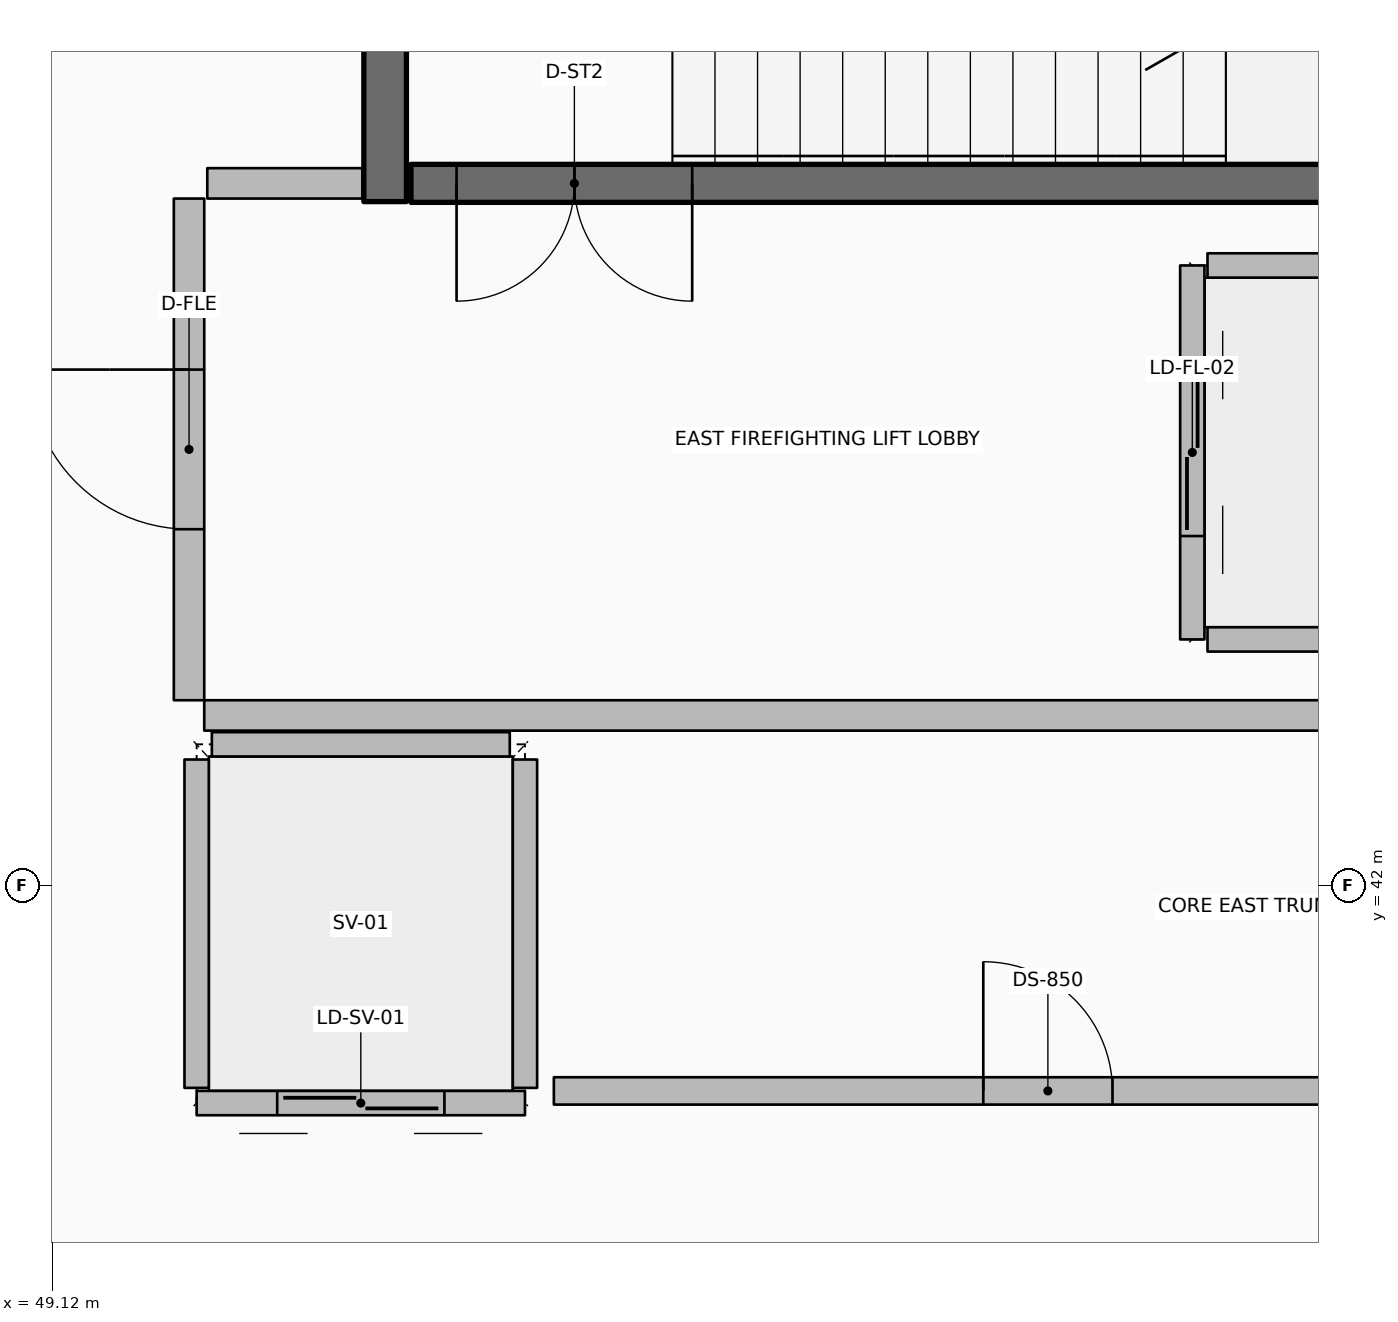
"""IFC4 building model, lengths in metres.
Left out: names, types, materials, properties, quantities, classifications, styles, units other than length and angle.
Written with IfcOpenShell. Run it as: python <this file> out.ifc"""

import sys

from ifc_helpers import new_model, si_unit, direction, frame, frame_2d, origin, origin_2d, place, context, subcontext, project, spatial, rectangle, hollow_rectangle, extrude, element, fill, save


model = new_model("IFC4")
c1 = context("Model", 3, precision=1e-05, world=origin(), true_north=direction((0.0, 1.0)))
c2 = subcontext(c1, "Body", "Model", "MODEL_VIEW")
j1 = project(units=[si_unit("LENGTHUNIT", "METRE"), si_unit("PLANEANGLEUNIT", "RADIAN")], contexts=[c1])
p1 = place(None, origin())
s1 = spatial("IfcSite", under=j1, at=p1, CompositionType="ELEMENT")
p2 = place(p1, origin())
s2 = spatial("IfcBuilding", under=s1, at=p2, CompositionType="ELEMENT")
p3 = place(p2, frame((0.0, 0.0, 123.0)))
s3 = spatial("IfcBuildingStorey", under=s2, at=p3, CompositionType="ELEMENT", Elevation=123.0)
p4 = place(p3, frame((51.31, 46.5, 0.0), z_axis=(0.0, 0.0, 1.0), x_axis=(0.0, 1.0, 0.0)))
e1 = element("IfcWall", 1, at=p4, inside=s3, PredefinedType="SHEAR", context=c2, shape_type="SweptSolid", body=[
    extrude(rectangle(XDim=3.5, YDim=0.28, at=frame_2d((1.75, 0.0))), origin(), (0.0, 0.0, 1.0), 4.8),
])
p5 = place(p3, frame((56.84, 46.62, 0.0), z_axis=(0.0, 0.0, 1.0), x_axis=(1.0, 0.0, 0.0)))
e2 = element("IfcColumn", 2, at=p5, inside=s3, PredefinedType="COLUMN", context=c2, shape_type="SweptSolid", body=[
    extrude(hollow_rectangle(XDim=0.2, YDim=0.2, WallThickness=0.01, InnerFilletRadius=0.01, OuterFilletRadius=0.02, at=origin_2d()), origin(), (0.0, 0.0, 1.0), 2.195),
])
p6 = place(p3, frame((51.48, 46.62, 0.0), z_axis=(0.0, 0.0, 1.0), x_axis=(1.0, 0.0, 0.0)))
e3 = element("IfcWall", 3, at=p6, inside=s3, PredefinedType="SOLIDWALL", context=c2, shape_type="SweptSolid", body=[
    extrude(rectangle(XDim=7.54, YDim=0.25, at=frame_2d((3.77, 0.0))), origin(), (0.0, 0.0, 1.0), 4.4),
])
p7 = place(p6, frame((0.3, 0.0, 0.0)))
e4 = element("IfcOpeningElement", 4, at=p7, cuts=e3, PredefinedType="OPENING", context=c2, shape_type="SweptSolid", body=[
    extrude(rectangle(XDim=1.55, YDim=2.15, at=frame_2d((0.775, 1.075))), frame((0.0, 0.135, 0.0), z_axis=(0.0, -1.0, 0.0), x_axis=(1.0, 0.0, 0.0)), (0.0, 0.0, 1.0), 0.27),
])
p8 = place(p3, frame((56.62, 46.08, 0.0), z_axis=(0.0, 0.0, 1.0), x_axis=(0.0, -1.0, 0.0)))
e5 = element("IfcWall", 5, at=p8, inside=s3, PredefinedType="PARTITIONING", context=c2, shape_type="SweptSolid", body=[
    extrude(rectangle(XDim=2.46, YDim=0.16, at=frame_2d((1.23, 0.0))), origin(), (0.0, 0.0, 1.0), 4.4),
])
p9 = place(p8, frame((0.68, 0.0, 0.0)))
e6 = element("IfcOpeningElement", 6, at=p9, cuts=e5, PredefinedType="OPENING", context=c2, shape_type="SweptSolid", body=[
    extrude(rectangle(XDim=1.1, YDim=2.1, at=frame_2d((0.55, 1.05))), frame((0.0, 0.09, 0.0), z_axis=(0.0, -1.0, 0.0), x_axis=(1.0, 0.0, 0.0)), (0.0, 0.0, 1.0), 0.18),
])
for number, where, z_axis, x_axis in (
    (7, (56.72, 46.08, 0.0), (0.0, 0.0, 1.0), (1.0, 0.0, 0.0)),
    (8, (56.72, 43.62, 0.0), (0.0, 0.0, 1.0), (1.0, 0.0, 0.0)),
):
    element("IfcWall", number, at=place(p3, frame(where, z_axis=z_axis, x_axis=x_axis)), inside=s3, PredefinedType="PARTITIONING", context=c2, shape_type="SweptSolid", body=[
        extrude(rectangle(XDim=2.06, YDim=0.16, at=frame_2d((1.03, 0.0))), origin(), (0.0, 0.0, 1.0), 4.4),
    ])
p10 = place(p3, frame((52.23, 40.57, 0.0), z_axis=(0.0, 0.0, 1.0), x_axis=(-1.0, 0.0, 0.0)))
e9 = element("IfcWall", 9, at=p10, inside=s3, PredefinedType="PARTITIONING", context=c2, shape_type="SweptSolid", body=[
    extrude(rectangle(XDim=2.16, YDim=0.16, at=frame_2d((1.08, 0.0))), origin(), (0.0, 0.0, 1.0), 4.4),
])
p11 = place(p10, frame((0.53, 0.0, 0.0)))
e10 = element("IfcOpeningElement", 10, at=p11, cuts=e9, PredefinedType="OPENING", context=c2, shape_type="SweptSolid", body=[
    extrude(rectangle(XDim=1.1, YDim=2.1, at=frame_2d((0.55, 1.05))), frame((0.0, 0.09, 0.0), z_axis=(0.0, -1.0, 0.0), x_axis=(1.0, 0.0, 0.0)), (0.0, 0.0, 1.0), 0.18),
])
for number, where, z_axis, x_axis in (
    (11, (52.23, 40.67, 0.0), (0.0, 0.0, 1.0), (0.0, 1.0, 0.0)),
    (12, (50.07, 40.67, 0.0), (0.0, 0.0, 1.0), (0.0, 1.0, 0.0)),
):
    element("IfcWall", number, at=place(p3, frame(where, z_axis=z_axis, x_axis=x_axis)), inside=s3, PredefinedType="PARTITIONING", context=c2, shape_type="SweptSolid", body=[
        extrude(rectangle(XDim=2.16, YDim=0.16, at=frame_2d((1.08, 0.0))), origin(), (0.0, 0.0, 1.0), 4.4),
    ])
p12 = place(p3, frame((50.17, 42.93, 0.0), z_axis=(0.0, 0.0, 1.0), x_axis=(1.0, 0.0, 0.0)))
e13 = element("IfcWall", 13, at=p12, inside=s3, PredefinedType="PARTITIONING", context=c2, shape_type="SweptSolid", body=[
    extrude(rectangle(XDim=1.96, YDim=0.16, at=frame_2d((0.98, 0.0))), origin(), (0.0, 0.0, 1.0), 4.4),
])
p13 = place(p3, frame((52.42, 40.65, 0.0), z_axis=(0.0, 0.0, 1.0), x_axis=(1.0, 0.0, 0.0)))
e14 = element("IfcWall", 14, at=p13, inside=s3, PredefinedType="PARTITIONING", context=c2, shape_type="SweptSolid", body=[
    extrude(rectangle(XDim=6.5, YDim=0.18, at=frame_2d((3.25, 0.0))), origin(), (0.0, 0.0, 1.0), 4.4),
])
p14 = place(p13, frame((2.825, 0.0, 0.0)))
e15 = element("IfcOpeningElement", 15, at=p14, cuts=e14, PredefinedType="OPENING", context=c2, shape_type="SweptSolid", body=[
    extrude(rectangle(XDim=0.85, YDim=2.06, at=frame_2d((0.425, 1.03))), frame((0.0, 0.1, 0.0), z_axis=(0.0, -1.0, 0.0), x_axis=(1.0, 0.0, 0.0)), (0.0, 0.0, 1.0), 0.2),
])
p15 = place(p3, frame((50.12, 43.12, 0.0), z_axis=(0.0, 0.0, 1.0), x_axis=(1.0, 0.0, 0.0)))
e16 = element("IfcWall", 16, at=p15, inside=s3, PredefinedType="PARTITIONING", context=c2, shape_type="SweptSolid", body=[
    extrude(rectangle(XDim=8.88, YDim=0.2, at=frame_2d((4.44, 0.0))), origin(), (0.0, 0.0, 1.0), 4.4),
])
p16 = place(p3, frame((50.14, 46.62, 0.0), z_axis=(0.0, 0.0, 1.0), x_axis=(1.0, 0.0, 0.0)))
e17 = element("IfcWall", 17, at=p16, inside=s3, PredefinedType="PARTITIONING", context=c2, shape_type="SweptSolid", body=[
    extrude(rectangle(XDim=1.02, YDim=0.2, at=frame_2d((0.51, 0.0))), origin(), (0.0, 0.0, 1.0), 4.4),
])
p17 = place(p3, frame((50.02, 43.22, 0.0), z_axis=(0.0, 0.0, 1.0), x_axis=(0.0, 1.0, 0.0)))
e18 = element("IfcWall", 18, at=p17, inside=s3, PredefinedType="PARTITIONING", context=c2, shape_type="SweptSolid", body=[
    extrude(rectangle(XDim=3.3, YDim=0.2, at=frame_2d((1.65, 0.0))), origin(), (0.0, 0.0, 1.0), 4.4),
])
p18 = place(p17, frame((1.125, 0.0, 0.0)))
e19 = element("IfcOpeningElement", 19, at=p18, cuts=e18, PredefinedType="OPENING", context=c2, shape_type="SweptSolid", body=[
    extrude(rectangle(XDim=1.05, YDim=2.1, at=frame_2d((0.525, 1.05))), frame((0.0, 0.11, 0.0), z_axis=(0.0, -1.0, 0.0), x_axis=(1.0, 0.0, 0.0)), (0.0, 0.0, 1.0), 0.22),
])
p19 = place(p7, origin())
e20 = element("IfcDoor", 20, at=p19, inside=s3, OperationType="DOUBLE_DOOR_SINGLE_SWING", PredefinedType="DOOR", context=c2, shape_type="SweptSolid", body=[
    extrude(rectangle(XDim=1.55, YDim=2.15, at=frame_2d((0.775, 1.075))), frame((0.0, 0.025, 0.0), z_axis=(0.0, -1.0, 0.0), x_axis=(1.0, 0.0, 0.0)), (0.0, 0.0, 1.0), 0.05),
])
fill(e4, e20)
p20 = place(p9, origin())
e21 = element("IfcDoor", 21, at=p20, inside=s3, OperationType="DOUBLE_DOOR_SLIDING", PredefinedType="DOOR", context=c2, shape_type="SweptSolid", body=[
    extrude(rectangle(XDim=1.1, YDim=2.1, at=frame_2d((0.55, 1.05))), frame((0.0, 0.025, 0.0), z_axis=(0.0, -1.0, 0.0), x_axis=(1.0, 0.0, 0.0)), (0.0, 0.0, 1.0), 0.05),
])
fill(e6, e21)
p21 = place(p11, origin())
e22 = element("IfcDoor", 22, at=p21, inside=s3, OperationType="DOUBLE_DOOR_SLIDING", PredefinedType="DOOR", context=c2, shape_type="SweptSolid", body=[
    extrude(rectangle(XDim=1.1, YDim=2.1, at=frame_2d((0.55, 1.05))), frame((0.0, 0.025, 0.0), z_axis=(0.0, -1.0, 0.0), x_axis=(1.0, 0.0, 0.0)), (0.0, 0.0, 1.0), 0.05),
])
fill(e10, e22)
p22 = place(p14, origin())
e23 = element("IfcDoor", 23, at=p22, inside=s3, OperationType="SINGLE_SWING_LEFT", PredefinedType="DOOR", context=c2, shape_type="SweptSolid", body=[
    extrude(rectangle(XDim=0.85, YDim=2.06, at=frame_2d((0.425, 1.03))), frame((0.0, 0.025, 0.0), z_axis=(0.0, -1.0, 0.0), x_axis=(1.0, 0.0, 0.0)), (0.0, 0.0, 1.0), 0.05),
])
fill(e15, e23)
p23 = place(p18, origin())
e24 = element("IfcDoor", 24, at=p23, inside=s3, OperationType="SINGLE_SWING_RIGHT", PredefinedType="DOOR", context=c2, shape_type="SweptSolid", body=[
    extrude(rectangle(XDim=1.05, YDim=2.1, at=frame_2d((0.525, 1.05))), frame((0.0, 0.025, 0.0), z_axis=(0.0, -1.0, 0.0), x_axis=(1.0, 0.0, 0.0)), (0.0, 0.0, 1.0), 0.05),
])
fill(e19, e24)
save(model, sys.argv[1])
